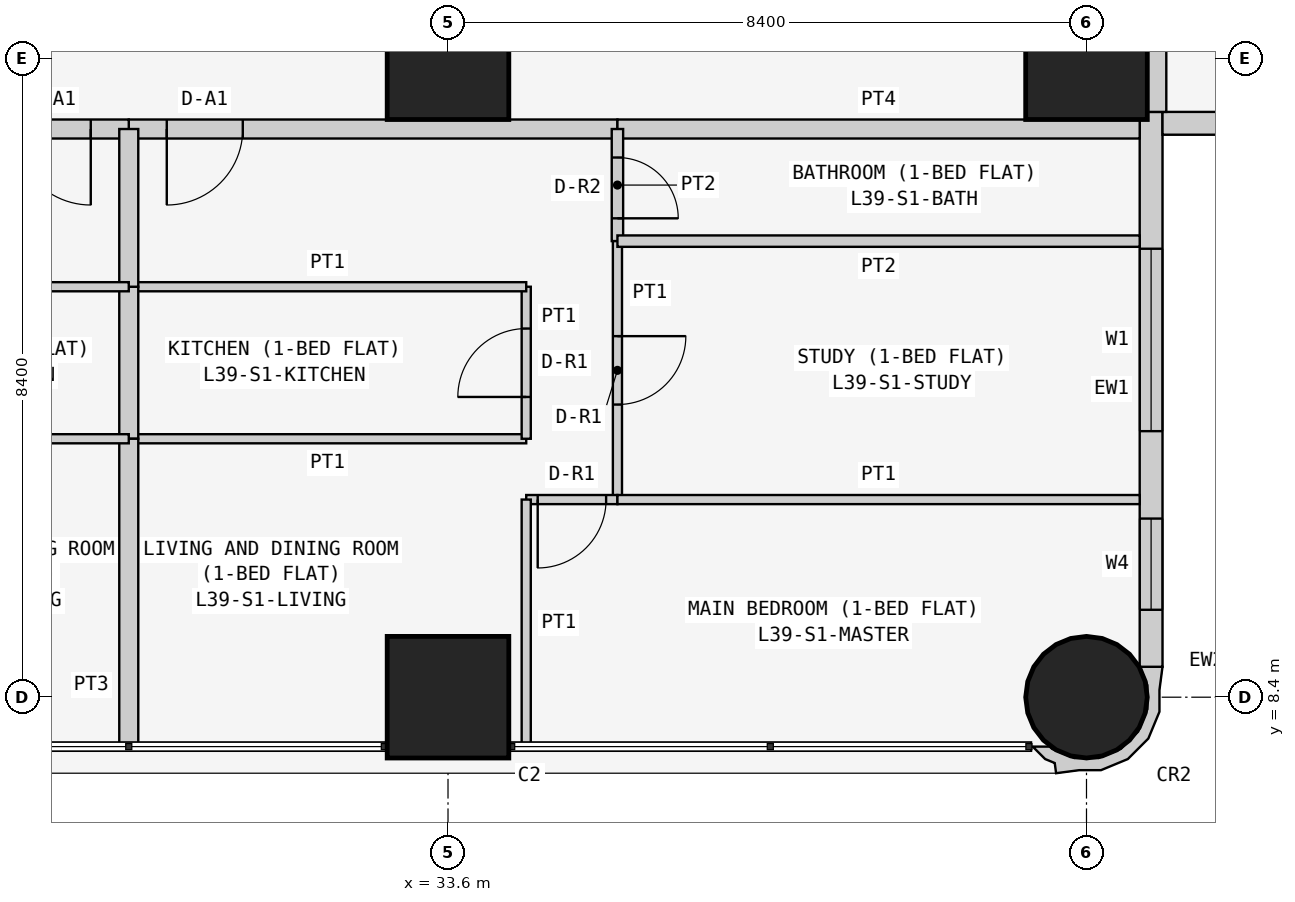
"""IFC4 building model, lengths in metres.
Left out: names, types, materials, properties, quantities, classifications, styles, units other than length and angle.
Written with IfcOpenShell. Run it as: python <this file> out.ifc"""

import sys

from ifc_helpers import new_model, si_unit, direction, frame, frame_2d, origin, origin_2d, place, context, subcontext, project, spatial, polyline, rectangle, circle, outline, extrude, element, fill, save


model = new_model("IFC4")
c1 = context("Model", 3, precision=1e-05, world=origin(), true_north=direction((0.0, 1.0)))
c2 = subcontext(c1, "Body", "Model", "MODEL_VIEW")
j1 = project(units=[si_unit("LENGTHUNIT", "METRE"), si_unit("PLANEANGLEUNIT", "RADIAN")], contexts=[c1])
p1 = place(None, origin())
s1 = spatial("IfcSite", under=j1, at=p1, CompositionType="ELEMENT")
p2 = place(p1, origin())
s2 = spatial("IfcBuilding", under=s1, at=p2, CompositionType="ELEMENT")
p3 = place(p2, frame((0.0, 0.0, 152.1)))
s3 = spatial("IfcBuildingStorey", under=s2, at=p3, CompositionType="ELEMENT", Elevation=152.1)
for number, where, z_axis, x_axis in (
    (1, (33.6, 8.4, 0.0), (0.0, 0.0, 1.0), (1.0, 0.0, 0.0)),
    (2, (33.6, 16.8, 0.0), (0.0, 0.0, 1.0), (1.0, 0.0, 0.0)),
):
    element("IfcColumn", number, at=place(p3, frame(where, z_axis=z_axis, x_axis=x_axis)), inside=s3, PredefinedType="COLUMN", context=c2, shape_type="SweptSolid", body=[
        extrude(rectangle(XDim=1.6, YDim=1.6, at=origin_2d()), origin(), (0.0, 0.0, 1.0), 3.6),
    ])
p4 = place(p3, frame((42.0, 8.4, 0.0), z_axis=(0.0, 0.0, 1.0), x_axis=(1.0, 0.0, 0.0)))
e3 = element("IfcColumn", 3, at=p4, inside=s3, PredefinedType="COLUMN", context=c2, shape_type="SweptSolid", body=[
    extrude(circle(Radius=0.8, at=origin_2d()), origin(), (0.0, 0.0, 1.0), 3.6),
])
p5 = place(p3, frame((42.0, 16.8, 0.0), z_axis=(0.0, 0.0, 1.0), x_axis=(1.0, 0.0, 0.0)))
e4 = element("IfcColumn", 4, at=p5, inside=s3, PredefinedType="COLUMN", context=c2, shape_type="SweptSolid", body=[
    extrude(rectangle(XDim=1.6, YDim=1.6, at=origin_2d()), origin(), (0.0, 0.0, 1.0), 3.6),
])
p6 = place(p3, frame((42.85, 8.8, 0.0), z_axis=(0.0, 0.0, 1.0), x_axis=(0.0, 1.0, 0.0)))
e5 = element("IfcWall", 5, at=p6, inside=s3, PredefinedType="SOLIDWALL", context=c2, shape_type="SweptSolid", body=[
    extrude(rectangle(XDim=7.3, YDim=0.3, at=frame_2d((3.65, 0.0))), origin(), (0.0, 0.0, 1.0), 3.45),
])
p7 = place(p6, frame((3.1, 0.0, 0.9)))
e6 = element("IfcOpeningElement", 6, at=p7, cuts=e5, PredefinedType="OPENING", context=c2, shape_type="SweptSolid", body=[
    extrude(rectangle(XDim=2.4, YDim=1.5, at=frame_2d((1.2, 0.75))), frame((0.0, 0.16, 0.0), z_axis=(0.0, -1.0, 0.0), x_axis=(1.0, 0.0, 0.0)), (0.0, 0.0, 1.0), 0.32),
])
p8 = place(p6, frame((0.75, 0.0, 0.9)))
e7 = element("IfcOpeningElement", 7, at=p8, cuts=e5, PredefinedType="OPENING", context=c2, shape_type="SweptSolid", body=[
    extrude(rectangle(XDim=1.2, YDim=1.5, at=frame_2d((0.6, 0.75))), frame((0.0, 0.16, 0.0), z_axis=(0.0, -1.0, 0.0), x_axis=(1.0, 0.0, 0.0)), (0.0, 0.0, 1.0), 0.32),
])
p9 = place(p3, frame((43.0, 15.95, 0.0), z_axis=(0.0, 0.0, 1.0), x_axis=(1.0, 0.0, 0.0)))
e8 = element("IfcWall", 8, at=p9, inside=s3, PredefinedType="SOLIDWALL", context=c2, shape_type="SweptSolid", body=[
    extrude(rectangle(XDim=15.4, YDim=0.3, at=frame_2d((7.7, 0.0))), origin(), (0.0, 0.0, 1.0), 3.45),
])
p10 = place(p9, frame((1.2, 0.0, 0.9)))
e9 = element("IfcOpeningElement", 9, at=p10, cuts=e8, PredefinedType="OPENING", context=c2, shape_type="SweptSolid", body=[
    extrude(rectangle(XDim=1.8, YDim=1.5, at=frame_2d((0.9, 0.75))), frame((0.0, 0.16, 0.0), z_axis=(0.0, -1.0, 0.0), x_axis=(1.0, 0.0, 0.0)), (0.0, 0.0, 1.0), 0.32),
])
p11 = place(p9, frame((4.95, 0.0, 1.5)))
e10 = element("IfcOpeningElement", 10, at=p11, cuts=e8, PredefinedType="OPENING", context=c2, shape_type="SweptSolid", body=[
    extrude(rectangle(XDim=0.9, YDim=0.7, at=frame_2d((0.45, 0.35))), frame((0.0, 0.16, 0.0), z_axis=(0.0, -1.0, 0.0), x_axis=(1.0, 0.0, 0.0)), (0.0, 0.0, 1.0), 0.32),
])
p12 = place(p9, frame((8.5, 0.0, 0.9)))
e11 = element("IfcOpeningElement", 11, at=p12, cuts=e8, PredefinedType="OPENING", context=c2, shape_type="SweptSolid", body=[
    extrude(rectangle(XDim=1.8, YDim=1.5, at=frame_2d((0.9, 0.75))), frame((0.0, 0.16, 0.0), z_axis=(0.0, -1.0, 0.0), x_axis=(1.0, 0.0, 0.0)), (0.0, 0.0, 1.0), 0.32),
])
p13 = place(p9, frame((12.5, 0.0, 0.0)))
e12 = element("IfcOpeningElement", 12, at=p13, cuts=e8, PredefinedType="OPENING", context=c2, shape_type="SweptSolid", body=[
    extrude(rectangle(XDim=0.9, YDim=2.4, at=frame_2d((0.45, 1.2))), frame((0.0, 0.16, 0.0), z_axis=(0.0, -1.0, 0.0), x_axis=(1.0, 0.0, 0.0)), (0.0, 0.0, 1.0), 0.32),
])
p14 = place(p9, frame((13.5, 0.0, 0.9)))
e13 = element("IfcOpeningElement", 13, at=p14, cuts=e8, PredefinedType="OPENING", context=c2, shape_type="SweptSolid", body=[
    extrude(rectangle(XDim=1.2, YDim=1.5, at=frame_2d((0.6, 0.75))), frame((0.0, 0.16, 0.0), z_axis=(0.0, -1.0, 0.0), x_axis=(1.0, 0.0, 0.0)), (0.0, 0.0, 1.0), 0.32),
])
p15 = place(p3, frame((41.352, 7.805, 0.0), z_axis=(0.0, 0.0, 1.0), x_axis=(0.343276641956, -0.93923434088, 0.0)))
e14 = element("IfcWall", 14, at=p15, inside=s3, PredefinedType="SOLIDWALL", context=c2, shape_type="SweptSolid", body=[
    extrude(outline(polyline([(-0.369, 1.89), (-0.509, 1.621), (-0.49, 1.615), (-0.479, 1.609), (-0.211, 1.62), (0.088, 1.511), (0.323, 1.295), (0.457, 1.006), (0.47, 0.688), (0.361, 0.389), (0.145, 0.154), (0.108, 0.136), (0.031, -0.075), (0.241, 0.023), (0.333, 0.124), (0.465, 0.094), (0.532, 0.393), (0.631, 0.663), (0.614, 1.044), (0.453, 1.391), (0.172, 1.649), (-0.097, 1.748), (-0.369, 1.89)])), origin(), (0.0, 0.0, 1.0), 3.45),
])
p16 = place(p3, frame((42.925, 22.971, 0.0), z_axis=(0.0, 0.0, 1.0), x_axis=(0.0, -1.0, 0.0)))
e15 = element("IfcWall", 15, at=p16, inside=s3, PredefinedType="PARTITIONING", context=c2, shape_type="SweptSolid", body=[
    extrude(rectangle(XDim=6.871, YDim=0.25, at=frame_2d((3.436, 0.0))), origin(), (0.0, 0.0, 1.0), 3.45),
])
p17 = place(p3, frame((35.829, 15.875, 0.0), z_axis=(0.0, 0.0, 1.0), x_axis=(-1.0, 0.0, 0.0)))
e16 = element("IfcWall", 16, at=p17, inside=s3, PredefinedType="PARTITIONING", context=c2, shape_type="SweptSolid", body=[
    extrude(rectangle(XDim=6.429, YDim=0.25, at=frame_2d((3.215, 0.0))), origin(), (0.0, 0.0, 1.0), 3.45),
])
p18 = place(p17, frame((4.929, 0.0, 0.0)))
e17 = element("IfcOpeningElement", 17, at=p18, cuts=e16, PredefinedType="OPENING", context=c2, shape_type="SweptSolid", body=[
    extrude(rectangle(XDim=1.0, YDim=2.1, at=frame_2d((0.5, 1.05))), frame((0.0, 0.135, 0.0), z_axis=(0.0, -1.0, 0.0), x_axis=(1.0, 0.0, 0.0)), (0.0, 0.0, 1.0), 0.27),
])
p19 = place(p3, frame((42.7, 15.875, 0.0), z_axis=(0.0, 0.0, 1.0), x_axis=(-1.0, 0.0, 0.0)))
e18 = element("IfcWall", 18, at=p19, inside=s3, PredefinedType="PARTITIONING", context=c2, shape_type="SweptSolid", body=[
    extrude(rectangle(XDim=6.871, YDim=0.25, at=frame_2d((3.436, 0.0))), origin(), (0.0, 0.0, 1.0), 3.45),
])
p20 = place(p3, frame((29.4, 15.875, 0.0), z_axis=(0.0, 0.0, 1.0), x_axis=(-1.0, 0.0, 0.0)))
e19 = element("IfcWall", 19, at=p20, inside=s3, PredefinedType="PARTITIONING", context=c2, shape_type="SweptSolid", body=[
    extrude(rectangle(XDim=6.429, YDim=0.25, at=frame_2d((3.214, 0.0))), origin(), (0.0, 0.0, 1.0), 3.45),
])
p21 = place(p20, frame((0.5, 0.0, 0.0)))
e20 = element("IfcOpeningElement", 20, at=p21, cuts=e19, PredefinedType="OPENING", context=c2, shape_type="SweptSolid", body=[
    extrude(rectangle(XDim=1.0, YDim=2.1, at=frame_2d((0.5, 1.05))), frame((0.0, 0.135, 0.0), z_axis=(0.0, -1.0, 0.0), x_axis=(1.0, 0.0, 0.0)), (0.0, 0.0, 1.0), 0.27),
])
p22 = place(p3, frame((29.4, 11.8, 0.0), z_axis=(0.0, 0.0, 1.0), x_axis=(1.0, 0.0, 0.0)))
e21 = element("IfcWall", 21, at=p22, inside=s3, PredefinedType="PARTITIONING", context=c2, shape_type="SweptSolid", body=[
    extrude(rectangle(XDim=5.229, YDim=0.12, at=frame_2d((2.615, 0.0))), origin(), (0.0, 0.0, 1.0), 3.45),
])
p23 = place(p3, frame((34.629, 11.8, 0.0), z_axis=(0.0, 0.0, 1.0), x_axis=(0.0, 1.0, 0.0)))
e22 = element("IfcWall", 22, at=p23, inside=s3, PredefinedType="PARTITIONING", context=c2, shape_type="SweptSolid", body=[
    extrude(rectangle(XDim=2.0, YDim=0.12, at=frame_2d((1.0, 0.0))), origin(), (0.0, 0.0, 1.0), 3.45),
])
p24 = place(p23, frame((0.55, 0.0, 0.0)))
e23 = element("IfcOpeningElement", 23, at=p24, cuts=e22, PredefinedType="OPENING", context=c2, shape_type="SweptSolid", body=[
    extrude(rectangle(XDim=0.9, YDim=2.1, at=frame_2d((0.45, 1.05))), frame((0.0, 0.07, 0.0), z_axis=(0.0, -1.0, 0.0), x_axis=(1.0, 0.0, 0.0)), (0.0, 0.0, 1.0), 0.14),
])
p25 = place(p3, frame((34.629, 13.8, 0.0), z_axis=(0.0, 0.0, 1.0), x_axis=(-1.0, 0.0, 0.0)))
e24 = element("IfcWall", 24, at=p25, inside=s3, PredefinedType="PARTITIONING", context=c2, shape_type="SweptSolid", body=[
    extrude(rectangle(XDim=5.229, YDim=0.12, at=frame_2d((2.615, 0.0))), origin(), (0.0, 0.0, 1.0), 3.45),
])
p26 = place(p3, frame((29.4, 13.8, 0.0), z_axis=(0.0, 0.0, 1.0), x_axis=(0.0, -1.0, 0.0)))
e25 = element("IfcWall", 25, at=p26, inside=s3, PredefinedType="PARTITIONING", context=c2, shape_type="SweptSolid", body=[
    extrude(rectangle(XDim=2.0, YDim=0.25, at=frame_2d((1.0, 0.0))), origin(), (0.0, 0.0, 1.0), 2.848),
])
p27 = place(p3, frame((35.829, 15.875, 0.0), z_axis=(0.0, 0.0, 1.0), x_axis=(0.0, -1.0, 0.0)))
e26 = element("IfcWall", 26, at=p27, inside=s3, PredefinedType="PARTITIONING", context=c2, shape_type="SweptSolid", body=[
    extrude(rectangle(XDim=1.475, YDim=0.15, at=frame_2d((0.738, 0.0))), origin(), (0.0, 0.0, 1.0), 3.45),
])
p28 = place(p27, frame((0.375, 0.0, 0.0)))
e27 = element("IfcOpeningElement", 27, at=p28, cuts=e26, PredefinedType="OPENING", context=c2, shape_type="SweptSolid", body=[
    extrude(rectangle(XDim=0.8, YDim=2.1, at=frame_2d((0.4, 1.05))), frame((0.0, 0.085, 0.0), z_axis=(0.0, -1.0, 0.0), x_axis=(1.0, 0.0, 0.0)), (0.0, 0.0, 1.0), 0.17),
])
p29 = place(p3, frame((35.829, 14.4, 0.0), z_axis=(0.0, 0.0, 1.0), x_axis=(0.0, -1.0, 0.0)))
e28 = element("IfcWall", 28, at=p29, inside=s3, PredefinedType="PARTITIONING", context=c2, shape_type="SweptSolid", body=[
    extrude(rectangle(XDim=3.4, YDim=0.12, at=frame_2d((1.7, 0.0))), origin(), (0.0, 0.0, 1.0), 3.45),
])
p30 = place(p29, frame((1.25, 0.0, 0.0)))
e29 = element("IfcOpeningElement", 29, at=p30, cuts=e28, PredefinedType="OPENING", context=c2, shape_type="SweptSolid", body=[
    extrude(rectangle(XDim=0.9, YDim=2.1, at=frame_2d((0.45, 1.05))), frame((0.0, 0.07, 0.0), z_axis=(0.0, -1.0, 0.0), x_axis=(1.0, 0.0, 0.0)), (0.0, 0.0, 1.0), 0.14),
])
p31 = place(p3, frame((35.829, 11.0, 0.0), z_axis=(0.0, 0.0, 1.0), x_axis=(-1.0, 0.0, 0.0)))
e30 = element("IfcWall", 30, at=p31, inside=s3, PredefinedType="PARTITIONING", context=c2, shape_type="SweptSolid", body=[
    extrude(rectangle(XDim=1.2, YDim=0.12, at=frame_2d((0.6, 0.0))), origin(), (0.0, 0.0, 1.0), 3.45),
])
p32 = place(p31, frame((0.149, 0.0, 0.0)))
e31 = element("IfcOpeningElement", 31, at=p32, cuts=e30, PredefinedType="OPENING", context=c2, shape_type="SweptSolid", body=[
    extrude(rectangle(XDim=0.9, YDim=2.1, at=frame_2d((0.45, 1.05))), frame((0.0, 0.07, 0.0), z_axis=(0.0, -1.0, 0.0), x_axis=(1.0, 0.0, 0.0)), (0.0, 0.0, 1.0), 0.14),
])
p33 = place(p3, frame((34.629, 11.0, 0.0), z_axis=(0.0, 0.0, 1.0), x_axis=(0.0, -1.0, 0.0)))
e32 = element("IfcWall", 32, at=p33, inside=s3, PredefinedType="PARTITIONING", context=c2, shape_type="SweptSolid", body=[
    extrude(rectangle(XDim=3.25, YDim=0.12, at=frame_2d((1.625, 0.0))), origin(), (0.0, 0.0, 1.0), 3.45),
])
p34 = place(p3, frame((29.4, 7.75, 0.0), z_axis=(0.0, 0.0, 1.0), x_axis=(0.0, 1.0, 0.0)))
e33 = element("IfcWall", 33, at=p34, inside=s3, PredefinedType="PARTITIONING", context=c2, shape_type="SweptSolid", body=[
    extrude(rectangle(XDim=4.05, YDim=0.25, at=frame_2d((2.025, 0.0))), origin(), (0.0, 0.0, 1.0), 2.848),
])
p35 = place(p3, frame((29.4, 13.8, 0.0), z_axis=(0.0, 0.0, 1.0), x_axis=(0.0, 1.0, 0.0)))
e34 = element("IfcWall", 34, at=p35, inside=s3, PredefinedType="PARTITIONING", context=c2, shape_type="SweptSolid", body=[
    extrude(rectangle(XDim=2.075, YDim=0.25, at=frame_2d((1.038, 0.0))), origin(), (0.0, 0.0, 1.0), 2.848),
])
p36 = place(p3, frame((35.829, 14.4, 0.0), z_axis=(0.0, 0.0, 1.0), x_axis=(1.0, 0.0, 0.0)))
e35 = element("IfcWall", 35, at=p36, inside=s3, PredefinedType="PARTITIONING", context=c2, shape_type="SweptSolid", body=[
    extrude(rectangle(XDim=6.871, YDim=0.15, at=frame_2d((3.436, 0.0))), origin(), (0.0, 0.0, 1.0), 3.45),
])
p37 = place(p3, frame((35.829, 11.0, 0.0), z_axis=(0.0, 0.0, 1.0), x_axis=(1.0, 0.0, 0.0)))
e36 = element("IfcWall", 36, at=p37, inside=s3, PredefinedType="PARTITIONING", context=c2, shape_type="SweptSolid", body=[
    extrude(rectangle(XDim=6.871, YDim=0.12, at=frame_2d((3.436, 0.0))), origin(), (0.0, 0.0, 1.0), 3.45),
])
for number, where, z_axis, x_axis in (
    (37, (29.4, 11.8, 0.0), (0.0, 0.0, 1.0), (-1.0, 0.0, 0.0)),
    (38, (24.171, 13.8, 0.0), (0.0, 0.0, 1.0), (1.0, 0.0, 0.0)),
):
    element("IfcWall", number, at=place(p3, frame(where, z_axis=z_axis, x_axis=x_axis)), inside=s3, PredefinedType="PARTITIONING", context=c2, shape_type="SweptSolid", body=[
        extrude(rectangle(XDim=5.229, YDim=0.12, at=frame_2d((2.615, 0.0))), origin(), (0.0, 0.0, 1.0), 3.45),
    ])
p38 = place(p7, origin())
e39 = element("IfcWindow", 39, at=p38, inside=s3, PartitioningType="SINGLE_PANEL", PredefinedType="WINDOW", context=c2, shape_type="SweptSolid", body=[
    extrude(rectangle(XDim=2.4, YDim=1.5, at=frame_2d((1.2, 0.75))), frame((0.0, 0.03, 0.0), z_axis=(0.0, -1.0, 0.0), x_axis=(1.0, 0.0, 0.0)), (0.0, 0.0, 1.0), 0.06),
])
fill(e6, e39)
p39 = place(p8, origin())
e40 = element("IfcWindow", 40, at=p39, inside=s3, PartitioningType="SINGLE_PANEL", PredefinedType="WINDOW", context=c2, shape_type="SweptSolid", body=[
    extrude(rectangle(XDim=1.2, YDim=1.5, at=frame_2d((0.6, 0.75))), frame((0.0, 0.03, 0.0), z_axis=(0.0, -1.0, 0.0), x_axis=(1.0, 0.0, 0.0)), (0.0, 0.0, 1.0), 0.06),
])
fill(e7, e40)
p40 = place(p18, origin())
e41 = element("IfcDoor", 41, at=p40, inside=s3, OperationType="SINGLE_SWING_RIGHT", PredefinedType="DOOR", context=c2, shape_type="SweptSolid", body=[
    extrude(rectangle(XDim=1.0, YDim=2.1, at=frame_2d((0.5, 1.05))), frame((0.0, 0.025, 0.0), z_axis=(0.0, -1.0, 0.0), x_axis=(1.0, 0.0, 0.0)), (0.0, 0.0, 1.0), 0.05),
])
fill(e17, e41)
p41 = place(p24, origin())
e42 = element("IfcDoor", 42, at=p41, inside=s3, OperationType="SINGLE_SWING_LEFT", PredefinedType="DOOR", context=c2, shape_type="SweptSolid", body=[
    extrude(rectangle(XDim=0.9, YDim=2.1, at=frame_2d((0.45, 1.05))), frame((0.0, 0.025, 0.0), z_axis=(0.0, -1.0, 0.0), x_axis=(1.0, 0.0, 0.0)), (0.0, 0.0, 1.0), 0.05),
])
fill(e23, e42)
p42 = place(p28, origin())
e43 = element("IfcDoor", 43, at=p42, inside=s3, OperationType="SINGLE_SWING_RIGHT", PredefinedType="DOOR", context=c2, shape_type="SweptSolid", body=[
    extrude(rectangle(XDim=0.8, YDim=2.1, at=frame_2d((0.4, 1.05))), frame((0.0, 0.025, 0.0), z_axis=(0.0, -1.0, 0.0), x_axis=(1.0, 0.0, 0.0)), (0.0, 0.0, 1.0), 0.05),
])
fill(e27, e43)
p43 = place(p30, origin())
e44 = element("IfcDoor", 44, at=p43, inside=s3, OperationType="SINGLE_SWING_LEFT", PredefinedType="DOOR", context=c2, shape_type="SweptSolid", body=[
    extrude(rectangle(XDim=0.9, YDim=2.1, at=frame_2d((0.45, 1.05))), frame((0.0, 0.025, 0.0), z_axis=(0.0, -1.0, 0.0), x_axis=(1.0, 0.0, 0.0)), (0.0, 0.0, 1.0), 0.05),
])
fill(e29, e44)
p44 = place(p32, origin())
e45 = element("IfcDoor", 45, at=p44, inside=s3, OperationType="SINGLE_SWING_RIGHT", PredefinedType="DOOR", context=c2, shape_type="SweptSolid", body=[
    extrude(rectangle(XDim=0.9, YDim=2.1, at=frame_2d((0.45, 1.05))), frame((0.0, 0.025, 0.0), z_axis=(0.0, -1.0, 0.0), x_axis=(1.0, 0.0, 0.0)), (0.0, 0.0, 1.0), 0.05),
])
fill(e31, e45)
p45 = place(p21, origin())
e46 = element("IfcDoor", 46, at=p45, inside=s3, OperationType="SINGLE_SWING_LEFT", PredefinedType="DOOR", context=c2, shape_type="SweptSolid", body=[
    extrude(rectangle(XDim=1.0, YDim=2.1, at=frame_2d((0.5, 1.05))), frame((0.0, 0.025, 0.0), z_axis=(0.0, -1.0, 0.0), x_axis=(1.0, 0.0, 0.0)), (0.0, 0.0, 1.0), 0.05),
])
fill(e20, e46)
save(model, sys.argv[1])
